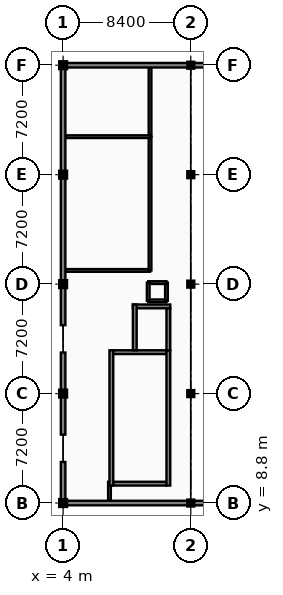
"""IFC4 building model, lengths in metres.
Left out: names, types, materials, properties, quantities, classifications, styles, units other than length and angle.
Written with IfcOpenShell. Run it as: python <this file> out.ifc"""

import sys

from ifc_helpers import new_model, si_unit, direction, frame, frame_2d, origin, origin_2d, place, context, subcontext, project, spatial, rectangle, i_section, extrude, element, fill, save


model = new_model("IFC4")
c1 = context("Model", 3, precision=1e-05, world=origin(), true_north=direction((0.0, 1.0)))
c2 = subcontext(c1, "Body", "Model", "MODEL_VIEW")
j1 = project(units=[si_unit("LENGTHUNIT", "METRE"), si_unit("PLANEANGLEUNIT", "RADIAN")], contexts=[c1])
p1 = place(None, origin())
s1 = spatial("IfcSite", under=j1, at=p1, CompositionType="ELEMENT")
p2 = place(p1, origin())
s2 = spatial("IfcBuilding", under=s1, at=p2, CompositionType="ELEMENT")
p3 = place(p2, frame((0.0, 0.0, 13.8)))
s3 = spatial("IfcBuildingStorey", under=s2, at=p3, CompositionType="ELEMENT", Elevation=13.8)
for number, where, z_axis, x_axis in (
    (1, (4.0, 8.8, 0.0), (0.0, 0.0, 1.0), (1.0, 0.0, 0.0)),
    (2, (4.0, 16.0, 0.0), (0.0, 0.0, 1.0), (1.0, 0.0, 0.0)),
    (3, (4.0, 23.2, 0.0), (0.0, 0.0, 1.0), (1.0, 0.0, 0.0)),
    (4, (4.0, 30.4, 0.0), (0.0, 0.0, 1.0), (1.0, 0.0, 0.0)),
    (5, (4.0, 37.6, 0.0), (0.0, 0.0, 1.0), (1.0, 0.0, 0.0)),
):
    element("IfcColumn", number, at=place(p3, frame(where, z_axis=z_axis, x_axis=x_axis)), inside=s3, PredefinedType="COLUMN", context=c2, shape_type="SweptSolid", body=[
        extrude(rectangle(XDim=0.36, YDim=0.36, at=origin_2d()), origin(), (0.0, 0.0, 1.0), 3.9),
    ])
for number, where, z_axis, x_axis in (
    (6, (12.4, 8.8, 0.0), (0.0, 0.0, 1.0), (1.0, 0.0, 0.0)),
    (7, (12.4, 16.0, 0.0), (0.0, 0.0, 1.0), (1.0, 0.0, 0.0)),
    (8, (12.4, 23.2, 0.0), (0.0, 0.0, 1.0), (1.0, 0.0, 0.0)),
    (9, (12.4, 30.4, 0.0), (0.0, 0.0, 1.0), (1.0, 0.0, 0.0)),
    (10, (12.4, 37.6, 0.0), (0.0, 0.0, 1.0), (1.0, 0.0, 0.0)),
):
    element("IfcColumn", number, at=place(p3, frame(where, z_axis=z_axis, x_axis=x_axis)), inside=s3, PredefinedType="COLUMN", context=c2, shape_type="SweptSolid", body=[
        extrude(i_section(OverallWidth=0.3, OverallDepth=0.3, WebThickness=0.011, FlangeThickness=0.019, at=origin_2d()), origin(), (0.0, 0.0, 1.0), 3.6),
    ])
p4 = place(p3, frame((7.05, 8.96, 0.0), z_axis=(0.0, 0.0, 1.0), x_axis=(0.0, 1.0, 0.0)))
e11 = element("IfcWall", 11, at=p4, inside=s3, PredefinedType="PARTITIONING", context=c2, shape_type="SweptSolid", body=[
    extrude(rectangle(XDim=1.24, YDim=0.18, at=frame_2d((0.62, 0.0))), origin(), (0.0, 0.0, 1.0), 3.01),
])
p5 = place(p3, frame((4.16, 24.1, 0.0), z_axis=(0.0, 0.0, 1.0), x_axis=(1.0, 0.0, 0.0)))
e12 = element("IfcWall", 12, at=p5, inside=s3, PredefinedType="PARTITIONING", context=c2, shape_type="SweptSolid", body=[
    extrude(rectangle(XDim=5.56, YDim=0.18, at=frame_2d((2.78, 0.0))), origin(), (0.0, 0.0, 1.0), 3.09),
])
p6 = place(p3, frame((9.72, 24.1, 0.0), z_axis=(0.0, 0.0, 1.0), x_axis=(0.0, 1.0, 0.0)))
e13 = element("IfcWall", 13, at=p6, inside=s3, PredefinedType="PARTITIONING", context=c2, shape_type="SweptSolid", body=[
    extrude(rectangle(XDim=8.8, YDim=0.18, at=frame_2d((4.4, 0.0))), origin(), (0.0, 0.0, 1.0), 3.01),
])
p7 = place(p6, frame((3.9, 0.0, -0.01)))
e14 = element("IfcOpeningElement", 14, at=p7, cuts=e13, PredefinedType="OPENING", context=c2, shape_type="SweptSolid", body=[
    extrude(rectangle(XDim=1.0, YDim=2.16, at=frame_2d((0.5, 1.08))), frame((0.0, 0.1, 0.0), z_axis=(0.0, -1.0, 0.0), x_axis=(1.0, 0.0, 0.0)), (0.0, 0.0, 1.0), 0.2),
])
p8 = place(p3, frame((9.72, 32.9, 0.0), z_axis=(0.0, 0.0, 1.0), x_axis=(0.0, 1.0, 0.0)))
e15 = element("IfcWall", 15, at=p8, inside=s3, PredefinedType="PARTITIONING", context=c2, shape_type="SweptSolid", body=[
    extrude(rectangle(XDim=4.56, YDim=0.18, at=frame_2d((2.28, 0.0))), origin(), (0.0, 0.0, 1.0), 3.01),
])
p9 = place(p8, frame((1.78, 0.0, -0.01)))
e16 = element("IfcOpeningElement", 16, at=p9, cuts=e15, PredefinedType="OPENING", context=c2, shape_type="SweptSolid", body=[
    extrude(rectangle(XDim=1.0, YDim=2.16, at=frame_2d((0.5, 1.08))), frame((0.0, 0.1, 0.0), z_axis=(0.0, -1.0, 0.0), x_axis=(1.0, 0.0, 0.0)), (0.0, 0.0, 1.0), 0.2),
])
p10 = place(p3, frame((4.16, 32.9, 0.0), z_axis=(0.0, 0.0, 1.0), x_axis=(1.0, 0.0, 0.0)))
e17 = element("IfcWall", 17, at=p10, inside=s3, PredefinedType="PARTITIONING", context=c2, shape_type="SweptSolid", body=[
    extrude(rectangle(XDim=5.56, YDim=0.18, at=frame_2d((2.78, 0.0))), origin(), (0.0, 0.0, 1.0), 3.09),
])
p11 = place(p3, frame((4.0, 8.8, 0.0), z_axis=(0.0, 0.0, 1.0), x_axis=(1.0, 0.0, 0.0)))
e18 = element("IfcWall", 18, at=p11, inside=s3, PredefinedType="SOLIDWALL", context=c2, shape_type="SweptSolid", body=[
    extrude(rectangle(XDim=8.4, YDim=0.3, at=frame_2d((4.2, 0.0))), origin(), (0.0, 0.0, 1.0), 3.01),
])
p12 = place(p11, frame((0.46, 0.0, 0.85)))
e19 = element("IfcOpeningElement", 19, at=p12, cuts=e18, PredefinedType="OPENING", context=c2, shape_type="SweptSolid", body=[
    extrude(rectangle(XDim=0.9, YDim=2.02, at=frame_2d((0.45, 1.01))), frame((0.0, 0.16, 0.0), z_axis=(0.0, -1.0, 0.0), x_axis=(1.0, 0.0, 0.0)), (0.0, 0.0, 1.0), 0.32),
])
p13 = place(p11, frame((6.86, 0.0, 0.85)))
e20 = element("IfcOpeningElement", 20, at=p13, cuts=e18, PredefinedType="OPENING", context=c2, shape_type="SweptSolid", body=[
    extrude(rectangle(XDim=0.9, YDim=2.02, at=frame_2d((0.45, 1.01))), frame((0.0, 0.16, 0.0), z_axis=(0.0, -1.0, 0.0), x_axis=(1.0, 0.0, 0.0)), (0.0, 0.0, 1.0), 0.32),
])
p14 = place(p3, frame((12.4, 8.8, 0.0), z_axis=(0.0, 0.0, 1.0), x_axis=(1.0, 0.0, 0.0)))
e21 = element("IfcWall", 21, at=p14, inside=s3, PredefinedType="SOLIDWALL", context=c2, shape_type="SweptSolid", body=[
    extrude(rectangle(XDim=3.3, YDim=0.3, at=frame_2d((1.65, 0.0))), origin(), (0.0, 0.0, 1.0), 3.01),
])
p15 = place(p3, frame((12.4, 37.6, 0.0), z_axis=(0.0, 0.0, 1.0), x_axis=(-1.0, 0.0, 0.0)))
e22 = element("IfcWall", 22, at=p15, inside=s3, PredefinedType="SOLIDWALL", context=c2, shape_type="SweptSolid", body=[
    extrude(rectangle(XDim=8.4, YDim=0.3, at=frame_2d((4.2, 0.0))), origin(), (0.0, 0.0, 1.0), 3.01),
])
p16 = place(p15, frame((0.46, 0.0, 0.85)))
e23 = element("IfcOpeningElement", 23, at=p16, cuts=e22, PredefinedType="OPENING", context=c2, shape_type="SweptSolid", body=[
    extrude(rectangle(XDim=0.9, YDim=2.02, at=frame_2d((0.45, 1.01))), frame((0.0, 0.16, 0.0), z_axis=(0.0, -1.0, 0.0), x_axis=(1.0, 0.0, 0.0)), (0.0, 0.0, 1.0), 0.32),
])
p17 = place(p15, frame((6.86, 0.0, 0.85)))
e24 = element("IfcOpeningElement", 24, at=p17, cuts=e22, PredefinedType="OPENING", context=c2, shape_type="SweptSolid", body=[
    extrude(rectangle(XDim=0.9, YDim=2.02, at=frame_2d((0.45, 1.01))), frame((0.0, 0.16, 0.0), z_axis=(0.0, -1.0, 0.0), x_axis=(1.0, 0.0, 0.0)), (0.0, 0.0, 1.0), 0.32),
])
p18 = place(p3, frame((15.7, 37.6, 0.0), z_axis=(0.0, 0.0, 1.0), x_axis=(-1.0, 0.0, 0.0)))
e25 = element("IfcWall", 25, at=p18, inside=s3, PredefinedType="SOLIDWALL", context=c2, shape_type="SweptSolid", body=[
    extrude(rectangle(XDim=3.3, YDim=0.3, at=frame_2d((1.65, 0.0))), origin(), (0.0, 0.0, 1.0), 3.01),
])
for number, where, z_axis, x_axis in (
    (26, (4.0, 16.0, 0.0), (0.0, 0.0, 1.0), (0.0, -1.0, 0.0)),
    (27, (4.0, 11.5, 0.0), (0.0, 0.0, 1.0), (0.0, -1.0, 0.0)),
    (28, (4.0, 23.2, 0.0), (0.0, 0.0, 1.0), (0.0, -1.0, 0.0)),
    (29, (4.0, 18.7, 0.0), (0.0, 0.0, 1.0), (0.0, -1.0, 0.0)),
):
    element("IfcWall", number, at=place(p3, frame(where, z_axis=z_axis, x_axis=x_axis)), inside=s3, PredefinedType="SOLIDWALL", context=c2, shape_type="SweptSolid", body=[
        extrude(rectangle(XDim=2.7, YDim=0.3, at=frame_2d((1.35, 0.0))), origin(), (0.0, 0.0, 1.0), 3.01),
    ])
p19 = place(p3, frame((4.0, 30.4, 0.0), z_axis=(0.0, 0.0, 1.0), x_axis=(0.0, -1.0, 0.0)))
e30 = element("IfcWall", 30, at=p19, inside=s3, PredefinedType="SOLIDWALL", context=c2, shape_type="SweptSolid", body=[
    extrude(rectangle(XDim=7.2, YDim=0.3, at=frame_2d((3.6, 0.0))), origin(), (0.0, 0.0, 1.0), 3.01),
])
p20 = place(p19, frame((0.46, 0.0, 0.85)))
e31 = element("IfcOpeningElement", 31, at=p20, cuts=e30, PredefinedType="OPENING", context=c2, shape_type="SweptSolid", body=[
    extrude(rectangle(XDim=0.9, YDim=2.02, at=frame_2d((0.45, 1.01))), frame((0.0, 0.16, 0.0), z_axis=(0.0, -1.0, 0.0), x_axis=(1.0, 0.0, 0.0)), (0.0, 0.0, 1.0), 0.32),
])
p21 = place(p19, frame((5.06, 0.0, 0.85)))
e32 = element("IfcOpeningElement", 32, at=p21, cuts=e30, PredefinedType="OPENING", context=c2, shape_type="SweptSolid", body=[
    extrude(rectangle(XDim=0.9, YDim=2.02, at=frame_2d((0.45, 1.01))), frame((0.0, 0.16, 0.0), z_axis=(0.0, -1.0, 0.0), x_axis=(1.0, 0.0, 0.0)), (0.0, 0.0, 1.0), 0.32),
])
p22 = place(p3, frame((4.0, 37.6, 0.0), z_axis=(0.0, 0.0, 1.0), x_axis=(0.0, -1.0, 0.0)))
e33 = element("IfcWall", 33, at=p22, inside=s3, PredefinedType="SOLIDWALL", context=c2, shape_type="SweptSolid", body=[
    extrude(rectangle(XDim=7.2, YDim=0.3, at=frame_2d((3.6, 0.0))), origin(), (0.0, 0.0, 1.0), 3.01),
])
p23 = place(p22, frame((0.46, 0.0, 0.85)))
e34 = element("IfcOpeningElement", 34, at=p23, cuts=e33, PredefinedType="OPENING", context=c2, shape_type="SweptSolid", body=[
    extrude(rectangle(XDim=0.9, YDim=2.02, at=frame_2d((0.45, 1.01))), frame((0.0, 0.16, 0.0), z_axis=(0.0, -1.0, 0.0), x_axis=(1.0, 0.0, 0.0)), (0.0, 0.0, 1.0), 0.32),
])
p24 = place(p22, frame((5.66, 0.0, 0.85)))
e35 = element("IfcOpeningElement", 35, at=p24, cuts=e33, PredefinedType="OPENING", context=c2, shape_type="SweptSolid", body=[
    extrude(rectangle(XDim=0.9, YDim=2.02, at=frame_2d((0.45, 1.01))), frame((0.0, 0.16, 0.0), z_axis=(0.0, -1.0, 0.0), x_axis=(1.0, 0.0, 0.0)), (0.0, 0.0, 1.0), 0.32),
])
p25 = place(p3, frame((7.3, 10.075, 0.0), z_axis=(0.0, 0.0, 1.0), x_axis=(1.0, 0.0, 0.0)))
e36 = element("IfcWall", 36, at=p25, inside=s3, PredefinedType="SHEAR", context=c2, shape_type="SweptSolid", body=[
    extrude(rectangle(XDim=3.5, YDim=0.25, at=frame_2d((1.75, 0.0))), origin(), (0.0, 0.0, 1.0), 3.9),
])
p26 = place(p25, frame((1.1, 0.0, -0.01)))
e37 = element("IfcOpeningElement", 37, at=p26, cuts=e36, PredefinedType="OPENING", context=c2, shape_type="SweptSolid", body=[
    extrude(rectangle(XDim=1.3, YDim=2.16, at=frame_2d((0.65, 1.08))), frame((0.0, 0.135, 0.0), z_axis=(0.0, -1.0, 0.0), x_axis=(1.0, 0.0, 0.0)), (0.0, 0.0, 1.0), 0.27),
])
p27 = place(p3, frame((7.175, 9.95, 0.0), z_axis=(0.0, 0.0, 1.0), x_axis=(0.0, 1.0, 0.0)))
e38 = element("IfcWall", 38, at=p27, inside=s3, PredefinedType="SHEAR", context=c2, shape_type="SweptSolid", body=[
    extrude(rectangle(XDim=8.9, YDim=0.25, at=frame_2d((4.45, 0.0))), origin(), (0.0, 0.0, 1.0), 3.9),
])
p28 = place(p3, frame((10.8, 18.725, 0.0), z_axis=(0.0, 0.0, 1.0), x_axis=(-1.0, 0.0, 0.0)))
e39 = element("IfcWall", 39, at=p28, inside=s3, PredefinedType="SHEAR", context=c2, shape_type="SweptSolid", body=[
    extrude(rectangle(XDim=3.5, YDim=0.25, at=frame_2d((1.75, 0.0))), origin(), (0.0, 0.0, 1.0), 3.9),
])
p29 = place(p3, frame((10.925, 9.95, 0.0), z_axis=(0.0, 0.0, 1.0), x_axis=(0.0, 1.0, 0.0)))
e40 = element("IfcWall", 40, at=p29, inside=s3, PredefinedType="SHEAR", context=c2, shape_type="SweptSolid", body=[
    extrude(rectangle(XDim=8.9, YDim=0.25, at=frame_2d((4.45, 0.0))), origin(), (0.0, 0.0, 1.0), 3.9),
])
p30 = place(p3, frame((8.59, 21.735, 0.0), z_axis=(0.0, 0.0, 1.0), x_axis=(1.0, 0.0, 0.0)))
e41 = element("IfcWall", 41, at=p30, inside=s3, PredefinedType="SHEAR", context=c2, shape_type="SweptSolid", body=[
    extrude(rectangle(XDim=2.46, YDim=0.25, at=frame_2d((1.23, 0.0))), origin(), (0.0, 0.0, 1.0), 3.9),
])
p31 = place(p3, frame((10.925, 18.85, 0.0), z_axis=(0.0, 0.0, 1.0), x_axis=(0.0, 1.0, 0.0)))
e42 = element("IfcWall", 42, at=p31, inside=s3, PredefinedType="SHEAR", context=c2, shape_type="SweptSolid", body=[
    extrude(rectangle(XDim=2.76, YDim=0.25, at=frame_2d((1.38, 0.0))), origin(), (0.0, 0.0, 1.0), 3.9),
])
p32 = place(p31, frame((0.83, 0.0, -0.01)))
e43 = element("IfcOpeningElement", 43, at=p32, cuts=e42, PredefinedType="OPENING", context=c2, shape_type="SweptSolid", body=[
    extrude(rectangle(XDim=1.1, YDim=2.16, at=frame_2d((0.55, 1.08))), frame((0.0, 0.135, 0.0), z_axis=(0.0, -1.0, 0.0), x_axis=(1.0, 0.0, 0.0)), (0.0, 0.0, 1.0), 0.27),
])
p33 = place(p3, frame((8.715, 18.85, 0.0), z_axis=(0.0, 0.0, 1.0), x_axis=(0.0, 1.0, 0.0)))
e44 = element("IfcWall", 44, at=p33, inside=s3, PredefinedType="SHEAR", context=c2, shape_type="SweptSolid", body=[
    extrude(rectangle(XDim=3.01, YDim=0.25, at=frame_2d((1.505, 0.0))), origin(), (0.0, 0.0, 1.0), 3.9),
])
p34 = place(p3, frame((9.6, 22.1, 0.0), z_axis=(0.0, 0.0, 1.0), x_axis=(1.0, 0.0, 0.0)))
e45 = element("IfcWall", 45, at=p34, inside=s3, PredefinedType="SOLIDWALL", context=c2, shape_type="SweptSolid", body=[
    extrude(rectangle(XDim=1.2, YDim=0.18, at=frame_2d((0.6, 0.0))), origin(), (0.0, 0.0, 1.0), 3.69),
])
p35 = place(p3, frame((10.8, 22.1, 0.0), z_axis=(0.0, 0.0, 1.0), x_axis=(0.0, 1.0, 0.0)))
e46 = element("IfcWall", 46, at=p35, inside=s3, PredefinedType="SOLIDWALL", context=c2, shape_type="SweptSolid", body=[
    extrude(rectangle(XDim=1.2, YDim=0.18, at=frame_2d((0.6, 0.0))), origin(), (0.0, 0.0, 1.0), 3.69),
])
p36 = place(p35, frame((0.2, 0.0, -0.01)))
e47 = element("IfcOpeningElement", 47, at=p36, cuts=e46, PredefinedType="OPENING", context=c2, shape_type="SweptSolid", body=[
    extrude(rectangle(XDim=0.8, YDim=2.06, at=frame_2d((0.4, 1.03))), frame((0.0, 0.1, 0.0), z_axis=(0.0, -1.0, 0.0), x_axis=(1.0, 0.0, 0.0)), (0.0, 0.0, 1.0), 0.2),
])
for number, where, z_axis, x_axis in (
    (48, (10.8, 23.3, 0.0), (0.0, 0.0, 1.0), (-1.0, 0.0, 0.0)),
    (49, (9.6, 23.3, 0.0), (0.0, 0.0, 1.0), (0.0, -1.0, 0.0)),
):
    element("IfcWall", number, at=place(p3, frame(where, z_axis=z_axis, x_axis=x_axis)), inside=s3, PredefinedType="SOLIDWALL", context=c2, shape_type="SweptSolid", body=[
        extrude(rectangle(XDim=1.2, YDim=0.18, at=frame_2d((0.6, 0.0))), origin(), (0.0, 0.0, 1.0), 3.69),
    ])
p37 = place(p7, frame((0.0, 0.0, 0.01)))
e50 = element("IfcDoor", 50, at=p37, inside=s3, OperationType="SINGLE_SWING_LEFT", PredefinedType="DOOR", context=c2, shape_type="SweptSolid", body=[
    extrude(rectangle(XDim=1.0, YDim=2.15, at=frame_2d((0.5, 1.075))), frame((0.0, 0.025, 0.0), z_axis=(0.0, -1.0, 0.0), x_axis=(1.0, 0.0, 0.0)), (0.0, 0.0, 1.0), 0.05),
])
fill(e14, e50)
p38 = place(p9, frame((1.0, 0.0, 0.01), z_axis=(0.0, 0.0, 1.0), x_axis=(-1.0, 0.0, 0.0)))
e51 = element("IfcDoor", 51, at=p38, inside=s3, OperationType="SINGLE_SWING_RIGHT", PredefinedType="DOOR", context=c2, shape_type="SweptSolid", body=[
    extrude(rectangle(XDim=1.0, YDim=2.15, at=frame_2d((0.5, 1.075))), frame((0.0, 0.025, 0.0), z_axis=(0.0, -1.0, 0.0), x_axis=(1.0, 0.0, 0.0)), (0.0, 0.0, 1.0), 0.05),
])
fill(e16, e51)
p39 = place(p12, origin())
e52 = element("IfcWindow", 52, at=p39, inside=s3, PartitioningType="SINGLE_PANEL", PredefinedType="WINDOW", context=c2, shape_type="SweptSolid", body=[
    extrude(rectangle(XDim=0.9, YDim=2.02, at=frame_2d((0.45, 1.01))), frame((0.0, 0.03, 0.0), z_axis=(0.0, -1.0, 0.0), x_axis=(1.0, 0.0, 0.0)), (0.0, 0.0, 1.0), 0.06),
])
fill(e19, e52)
p40 = place(p13, origin())
e53 = element("IfcWindow", 53, at=p40, inside=s3, PartitioningType="SINGLE_PANEL", PredefinedType="WINDOW", context=c2, shape_type="SweptSolid", body=[
    extrude(rectangle(XDim=0.9, YDim=2.02, at=frame_2d((0.45, 1.01))), frame((0.0, 0.03, 0.0), z_axis=(0.0, -1.0, 0.0), x_axis=(1.0, 0.0, 0.0)), (0.0, 0.0, 1.0), 0.06),
])
fill(e20, e53)
p41 = place(p16, origin())
e54 = element("IfcWindow", 54, at=p41, inside=s3, PartitioningType="SINGLE_PANEL", PredefinedType="WINDOW", context=c2, shape_type="SweptSolid", body=[
    extrude(rectangle(XDim=0.9, YDim=2.02, at=frame_2d((0.45, 1.01))), frame((0.0, 0.03, 0.0), z_axis=(0.0, -1.0, 0.0), x_axis=(1.0, 0.0, 0.0)), (0.0, 0.0, 1.0), 0.06),
])
fill(e23, e54)
p42 = place(p17, origin())
e55 = element("IfcWindow", 55, at=p42, inside=s3, PartitioningType="SINGLE_PANEL", PredefinedType="WINDOW", context=c2, shape_type="SweptSolid", body=[
    extrude(rectangle(XDim=0.9, YDim=2.02, at=frame_2d((0.45, 1.01))), frame((0.0, 0.03, 0.0), z_axis=(0.0, -1.0, 0.0), x_axis=(1.0, 0.0, 0.0)), (0.0, 0.0, 1.0), 0.06),
])
fill(e24, e55)
p43 = place(p20, origin())
e56 = element("IfcWindow", 56, at=p43, inside=s3, PartitioningType="SINGLE_PANEL", PredefinedType="WINDOW", context=c2, shape_type="SweptSolid", body=[
    extrude(rectangle(XDim=0.9, YDim=2.02, at=frame_2d((0.45, 1.01))), frame((0.0, 0.03, 0.0), z_axis=(0.0, -1.0, 0.0), x_axis=(1.0, 0.0, 0.0)), (0.0, 0.0, 1.0), 0.06),
])
fill(e31, e56)
p44 = place(p21, origin())
e57 = element("IfcWindow", 57, at=p44, inside=s3, PartitioningType="SINGLE_PANEL", PredefinedType="WINDOW", context=c2, shape_type="SweptSolid", body=[
    extrude(rectangle(XDim=0.9, YDim=2.02, at=frame_2d((0.45, 1.01))), frame((0.0, 0.03, 0.0), z_axis=(0.0, -1.0, 0.0), x_axis=(1.0, 0.0, 0.0)), (0.0, 0.0, 1.0), 0.06),
])
fill(e32, e57)
p45 = place(p23, origin())
e58 = element("IfcWindow", 58, at=p45, inside=s3, PartitioningType="SINGLE_PANEL", PredefinedType="WINDOW", context=c2, shape_type="SweptSolid", body=[
    extrude(rectangle(XDim=0.9, YDim=2.02, at=frame_2d((0.45, 1.01))), frame((0.0, 0.03, 0.0), z_axis=(0.0, -1.0, 0.0), x_axis=(1.0, 0.0, 0.0)), (0.0, 0.0, 1.0), 0.06),
])
fill(e34, e58)
p46 = place(p24, origin())
e59 = element("IfcWindow", 59, at=p46, inside=s3, PartitioningType="SINGLE_PANEL", PredefinedType="WINDOW", context=c2, shape_type="SweptSolid", body=[
    extrude(rectangle(XDim=0.9, YDim=2.02, at=frame_2d((0.45, 1.01))), frame((0.0, 0.03, 0.0), z_axis=(0.0, -1.0, 0.0), x_axis=(1.0, 0.0, 0.0)), (0.0, 0.0, 1.0), 0.06),
])
fill(e35, e59)
p47 = place(p26, frame((0.0, 0.0, 0.01)))
e60 = element("IfcDoor", 60, at=p47, inside=s3, OperationType="SINGLE_SWING_RIGHT", PredefinedType="DOOR", context=c2, shape_type="SweptSolid", body=[
    extrude(rectangle(XDim=1.3, YDim=2.15, at=frame_2d((0.65, 1.075))), frame((0.0, 0.025, 0.0), z_axis=(0.0, -1.0, 0.0), x_axis=(1.0, 0.0, 0.0)), (0.0, 0.0, 1.0), 0.05),
])
fill(e37, e60)
p48 = place(p32, frame((0.0, 0.0, 0.01)))
e61 = element("IfcDoor", 61, at=p48, inside=s3, OperationType="SLIDING_TO_LEFT", PredefinedType="DOOR", context=c2, shape_type="SweptSolid", body=[
    extrude(rectangle(XDim=1.1, YDim=2.15, at=frame_2d((0.55, 1.075))), frame((0.0, 0.025, 0.0), z_axis=(0.0, -1.0, 0.0), x_axis=(1.0, 0.0, 0.0)), (0.0, 0.0, 1.0), 0.05),
])
fill(e43, e61)
p49 = place(p36, frame((0.0, 0.0, 0.01)))
e62 = element("IfcDoor", 62, at=p49, inside=s3, OperationType="SINGLE_SWING_RIGHT", PredefinedType="DOOR", context=c2, shape_type="SweptSolid", body=[
    extrude(rectangle(XDim=0.8, YDim=2.05, at=frame_2d((0.4, 1.025))), frame((0.0, 0.025, 0.0), z_axis=(0.0, -1.0, 0.0), x_axis=(1.0, 0.0, 0.0)), (0.0, 0.0, 1.0), 0.05),
])
fill(e47, e62)
save(model, sys.argv[1])
